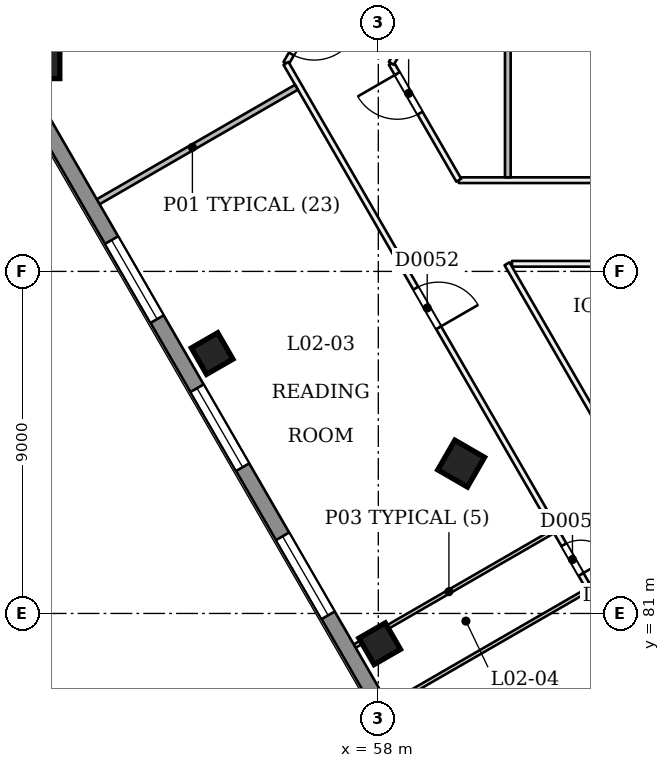
"""IFC4 building model, lengths in metres.
Left out: names, types, materials, properties, quantities, classifications, styles, units other than length and angle.
Written with IfcOpenShell. Run it as: python <this file> out.ifc"""

import sys

from ifc_helpers import new_model, si_unit, direction, frame, frame_2d, origin, origin_2d, place, context, subcontext, project, spatial, rectangle, extrude, element, fill, save


model = new_model("IFC4")
c1 = context("Model", 3, precision=1e-05, world=origin(), true_north=direction((0.0, 1.0)))
c2 = subcontext(c1, "Body", "Model", "MODEL_VIEW")
j1 = project(units=[si_unit("LENGTHUNIT", "METRE"), si_unit("PLANEANGLEUNIT", "RADIAN")], contexts=[c1])
p1 = place(None, origin())
s1 = spatial("IfcSite", under=j1, at=p1, CompositionType="ELEMENT")
p2 = place(p1, origin())
s2 = spatial("IfcBuilding", under=s1, at=p2, CompositionType="ELEMENT")
p3 = place(p2, frame((0.0, 0.0, 13.5)))
s3 = spatial("IfcBuildingStorey", under=s2, at=p3, CompositionType="ELEMENT", Elevation=13.5)
p4 = place(p3, frame((60.153, 84.896, -0.027), z_axis=(0.022221996839, 0.038427794534, 0.999014257888), x_axis=(-0.865947521527, -0.498655202022, 0.038443197811)))
e1 = element("IfcColumn", 1, at=p4, inside=s3, PredefinedType="COLUMN", context=c2, shape_type="SweptSolid", body=[
    extrude(rectangle(XDim=0.9, YDim=0.9, at=origin_2d()), origin(), (0.0, 0.0, 1.0), 4.504),
])
for number, where, z_axis, x_axis in (
    (2, (49.219, 95.474, 0.0), (0.0, 0.0, 1.0), (1.0, 1.745e-08, 0.0)),
    (3, (53.628, 87.838, 0.0), (0.0, 0.0, 1.0), (0.866, 0.5, 0.0)),
    (4, (58.036, 80.203, 0.0), (0.0, 0.0, 1.0), (0.866, 0.5, 0.0)),
):
    element("IfcColumn", number, at=place(p3, frame(where, z_axis=z_axis, x_axis=x_axis)), inside=s3, PredefinedType="COLUMN", context=c2, shape_type="SweptSolid", body=[
        extrude(rectangle(XDim=0.8, YDim=0.8, at=origin_2d()), origin(), (0.0, 0.0, 1.0), 4.5),
    ])
p5 = place(p3, frame((57.318, 98.5, 0.0), z_axis=(0.0, 0.0, 1.0), x_axis=(-0.500008701212, -0.866020380079, 0.0)))
e5 = element("IfcWall", 5, at=p5, inside=s3, PredefinedType="PARTITIONING", context=c2, shape_type="SweptSolid", body=[
    extrude(rectangle(XDim=3.495, YDim=0.15, at=frame_2d((1.747, 0.0))), origin(), (0.0, 0.0, 1.0), 4.05),
])
p6 = place(p5, frame((2.009, 0.0, 0.0)))
e6 = element("IfcOpeningElement", 6, at=p6, cuts=e5, PredefinedType="OPENING", context=c2, shape_type="SweptSolid", body=[
    extrude(rectangle(XDim=1.2, YDim=2.1, at=frame_2d((0.6, 1.05))), frame((0.0, 0.085, 0.0), z_axis=(0.0, -1.0, 0.0), x_axis=(1.0, 0.0, 0.0)), (0.0, 0.0, 1.0), 0.171),
])
p7 = place(p3, frame((55.57, 95.474, 0.0), z_axis=(0.0, 0.0, 1.0), x_axis=(0.500000085768, -0.866025354266, 0.0)))
e7 = element("IfcWall", 7, at=p7, inside=s3, PredefinedType="PARTITIONING", context=c2, shape_type="SweptSolid", body=[
    extrude(rectangle(XDim=55.365, YDim=0.15, at=frame_2d((27.682, 0.0))), origin(), (0.0, 0.0, 1.0), 4.05),
])
p8 = place(p7, frame((6.832, 0.0, 0.0)))
e8 = element("IfcOpeningElement", 8, at=p8, cuts=e7, PredefinedType="OPENING", context=c2, shape_type="SweptSolid", body=[
    extrude(rectangle(XDim=1.2, YDim=2.1, at=frame_2d((0.6, 1.05))), frame((0.0, 0.085, 0.0), z_axis=(0.0, -1.0, 0.0), x_axis=(1.0, 0.0, 0.0)), (0.0, 0.0, 1.0), 0.171),
])
p9 = place(p7, frame((14.626, 0.0, 0.0)))
e9 = element("IfcOpeningElement", 9, at=p9, cuts=e7, PredefinedType="OPENING", context=c2, shape_type="SweptSolid", body=[
    extrude(rectangle(XDim=0.9, YDim=2.1, at=frame_2d((0.45, 1.05))), frame((0.0, 0.085, 0.0), z_axis=(0.0, -1.0, 0.0), x_axis=(1.0, 0.0, 0.0)), (0.0, 0.0, 1.0), 0.171),
])
p10 = place(p7, frame((16.876, 0.0, 0.0)))
e10 = element("IfcOpeningElement", 10, at=p10, cuts=e7, PredefinedType="OPENING", context=c2, shape_type="SweptSolid", body=[
    extrude(rectangle(XDim=0.9, YDim=2.1, at=frame_2d((0.45, 1.05))), frame((0.0, 0.085, 0.0), z_axis=(0.0, -1.0, 0.0), x_axis=(1.0, 0.0, 0.0)), (0.0, 0.0, 1.0), 0.171),
])
p11 = place(p7, frame((24.832, 0.0, 0.0)))
e11 = element("IfcOpeningElement", 11, at=p11, cuts=e7, PredefinedType="OPENING", context=c2, shape_type="SweptSolid", body=[
    extrude(rectangle(XDim=1.2, YDim=2.1, at=frame_2d((0.6, 1.05))), frame((0.0, 0.085, 0.0), z_axis=(0.0, -1.0, 0.0), x_axis=(1.0, 0.0, 0.0)), (0.0, 0.0, 1.0), 0.171),
])
p12 = place(p7, frame((36.082, 0.0, 0.0)))
e12 = element("IfcOpeningElement", 12, at=p12, cuts=e7, PredefinedType="OPENING", context=c2, shape_type="SweptSolid", body=[
    extrude(rectangle(XDim=1.2, YDim=2.1, at=frame_2d((0.6, 1.05))), frame((0.0, 0.085, 0.0), z_axis=(0.0, -1.0, 0.0), x_axis=(1.0, 0.0, 0.0)), (0.0, 0.0, 1.0), 0.171),
])
p13 = place(p7, frame((45.082, 0.0, 0.0)))
e13 = element("IfcOpeningElement", 13, at=p13, cuts=e7, PredefinedType="OPENING", context=c2, shape_type="SweptSolid", body=[
    extrude(rectangle(XDim=1.2, YDim=2.1, at=frame_2d((0.6, 1.05))), frame((0.0, 0.085, 0.0), z_axis=(0.0, -1.0, 0.0), x_axis=(1.0, 0.0, 0.0)), (0.0, 0.0, 1.0), 0.171),
])
p14 = place(p7, frame((53.295, 0.0, 0.0)))
e14 = element("IfcOpeningElement", 14, at=p14, cuts=e7, PredefinedType="OPENING", context=c2, shape_type="SweptSolid", body=[
    extrude(rectangle(XDim=1.0, YDim=2.1, at=frame_2d((0.5, 1.05))), frame((0.0, 0.085, 0.0), z_axis=(0.0, -1.0, 0.0), x_axis=(1.0, 0.0, 0.0)), (0.0, 0.0, 1.0), 0.171),
])
p15 = place(p3, frame((61.516, 90.2, 0.0), z_axis=(0.0, 0.0, 1.0), x_axis=(1.0, 0.0, 0.0)))
e15 = element("IfcWall", 15, at=p15, inside=s3, PredefinedType="PARTITIONING", context=c2, shape_type="SweptSolid", body=[
    extrude(rectangle(XDim=16.884, YDim=0.15, at=frame_2d((8.442, 0.0))), origin(), (0.0, 0.0, 1.0), 4.05),
])
p16 = place(p15, frame((15.398, 0.0, 0.0)))
e16 = element("IfcOpeningElement", 16, at=p16, cuts=e15, PredefinedType="OPENING", context=c2, shape_type="SweptSolid", body=[
    extrude(rectangle(XDim=1.2, YDim=2.1, at=frame_2d((0.6, 1.05))), frame((0.0, 0.085, 0.0), z_axis=(0.0, -1.0, 0.0), x_axis=(1.0, 0.0, 0.0)), (0.0, 0.0, 1.0), 0.171),
])
p17 = place(p3, frame((70.2, 92.4, 0.0), z_axis=(0.0, 0.0, 1.0), x_axis=(-1.0, 0.0, 0.0)))
e17 = element("IfcWall", 17, at=p17, inside=s3, PredefinedType="PARTITIONING", context=c2, shape_type="SweptSolid", body=[
    extrude(rectangle(XDim=10.084, YDim=0.15, at=frame_2d((5.042, 0.0))), origin(), (0.0, 0.0, 1.0), 4.05),
])
p18 = place(p17, frame((3.503, 0.0, 0.0)))
e18 = element("IfcOpeningElement", 18, at=p18, cuts=e17, PredefinedType="OPENING", context=c2, shape_type="SweptSolid", body=[
    extrude(rectangle(XDim=1.2, YDim=2.1, at=frame_2d((0.6, 1.05))), frame((0.0, 0.085, 0.0), z_axis=(0.0, -1.0, 0.0), x_axis=(1.0, 0.0, 0.0)), (0.0, 0.0, 1.0), 0.171),
])
p19 = place(p3, frame((77.321, 62.6, 0.0), z_axis=(0.0, 0.0, 1.0), x_axis=(-0.500000743568, 0.866024974485, 0.0)))
e19 = element("IfcWall", 19, at=p19, inside=s3, PredefinedType="PARTITIONING", context=c2, shape_type="SweptSolid", body=[
    extrude(rectangle(XDim=31.87, YDim=0.15, at=frame_2d((15.935, 0.0))), origin(), (0.0, 0.0, 1.0), 4.05),
])
p20 = place(p19, frame((22.081, 0.0, 0.0)))
e20 = element("IfcOpeningElement", 20, at=p20, cuts=e19, PredefinedType="OPENING", context=c2, shape_type="SweptSolid", body=[
    extrude(rectangle(XDim=1.0, YDim=2.1, at=frame_2d((0.5, 1.05))), frame((0.0, 0.085, 0.0), z_axis=(0.0, -1.0, 0.0), x_axis=(1.0, 0.0, 0.0)), (0.0, 0.0, 1.0), 0.171),
])
p21 = place(p19, frame((6.657, 0.0, 0.0)))
e21 = element("IfcOpeningElement", 21, at=p21, cuts=e19, PredefinedType="OPENING", context=c2, shape_type="SweptSolid", body=[
    extrude(rectangle(XDim=1.2, YDim=2.1, at=frame_2d((0.6, 1.05))), frame((0.0, 0.085, 0.0), z_axis=(0.0, -1.0, 0.0), x_axis=(1.0, 0.0, 0.0)), (0.0, 0.0, 1.0), 0.171),
])
p22 = place(p3, frame((60.116, 92.4, 0.0), z_axis=(0.0, 0.0, 1.0), x_axis=(-0.500008260065, 0.866020634781, 0.0)))
e22 = element("IfcWall", 22, at=p22, inside=s3, PredefinedType="PARTITIONING", context=c2, shape_type="SweptSolid", body=[
    extrude(rectangle(XDim=3.549, YDim=0.15, at=frame_2d((1.775, 0.0))), origin(), (0.0, 0.0, 1.0), 4.05),
])
p23 = place(p22, frame((2.037, 0.0, 0.0)))
e23 = element("IfcOpeningElement", 23, at=p23, cuts=e22, PredefinedType="OPENING", context=c2, shape_type="SweptSolid", body=[
    extrude(rectangle(XDim=1.2, YDim=2.1, at=frame_2d((0.6, 1.05))), frame((0.0, 0.085, 0.0), z_axis=(0.0, -1.0, 0.0), x_axis=(1.0, 0.0, 0.0)), (0.0, 0.0, 1.0), 0.171),
])
p24 = place(p3, frame((58.342, 95.474, 0.0), z_axis=(0.0, 0.0, 1.0), x_axis=(0.500008701212, 0.866020380079, 0.0)))
e24 = element("IfcWall", 24, at=p24, inside=s3, PredefinedType="PARTITIONING", context=c2, shape_type="SweptSolid", body=[
    extrude(rectangle(XDim=3.495, YDim=0.15, at=frame_2d((1.747, 0.0))), origin(), (0.0, 0.0, 1.0), 4.05),
])
p25 = place(p3, frame((50.369, 91.683, 0.0), z_axis=(0.0, 0.0, 1.0), x_axis=(0.866025537322, 0.499999768706, 0.0)))
e25 = element("IfcWall", 25, at=p25, inside=s3, PredefinedType="PARTITIONING", context=c2, shape_type="SweptSolid", body=[
    extrude(rectangle(XDim=6.325, YDim=0.15, at=frame_2d((3.163, 0.0))), origin(), (0.0, 0.0, 1.0), 4.05),
])
p26 = place(p3, frame((57.119, 79.991, 0.0), z_axis=(0.0, 0.0, 1.0), x_axis=(0.866042250622, 0.499970819286, 0.0)))
e26 = element("IfcWall", 26, at=p26, inside=s3, PredefinedType="PARTITIONING", context=c2, shape_type="SweptSolid", body=[
    extrude(rectangle(XDim=6.325, YDim=0.1, at=frame_2d((3.163, 0.0))), origin(), (0.0, 0.0, 1.0), 4.05),
])
p27 = place(p3, frame((58.013, 78.443, 0.0), z_axis=(0.0, 0.0, 1.0), x_axis=(0.866032601554, 0.49998753289, 0.0)))
e27 = element("IfcWall", 27, at=p27, inside=s3, PredefinedType="PARTITIONING", context=c2, shape_type="SweptSolid", body=[
    extrude(rectangle(XDim=6.325, YDim=0.1, at=frame_2d((3.163, 0.0))), origin(), (0.0, 0.0, 1.0), 4.05),
])
p28 = place(p3, frame((59.369, 76.094, 0.0), z_axis=(0.0, 0.0, 1.0), x_axis=(0.866025537322, 0.499999768706, 0.0)))
e28 = element("IfcWall", 28, at=p28, inside=s3, PredefinedType="PARTITIONING", context=c2, shape_type="SweptSolid", body=[
    extrude(rectangle(XDim=6.325, YDim=0.1, at=frame_2d((3.163, 0.0))), origin(), (0.0, 0.0, 1.0), 4.05),
])
p29 = place(p3, frame((61.408, 104.9, 0.0), z_axis=(0.0, 0.0, 1.0), x_axis=(0.0, -1.0, 0.0)))
e29 = element("IfcWall", 29, at=p29, inside=s3, PredefinedType="PARTITIONING", context=c2, shape_type="SweptSolid", body=[
    extrude(rectangle(XDim=12.425, YDim=0.15, at=frame_2d((6.212, 0.0))), origin(), (0.0, 0.0, 1.0), 4.05),
])
p30 = place(p3, frame((48.238, 95.374, 0.0), z_axis=(0.0, 0.0, 1.0), x_axis=(0.50000615651, 0.866021849293, 0.0)))
e30 = element("IfcWall", 30, at=p30, inside=s3, PredefinedType="SOLIDWALL", context=c2, shape_type="SweptSolid", body=[
    extrude(rectangle(XDim=11.0, YDim=0.4, at=frame_2d((5.5, 0.0))), origin(), (0.0, 0.0, 1.0), 4.05),
])
p31 = place(p3, frame((79.673, 41.126, 0.0), z_axis=(0.0, 0.0, 1.0), x_axis=(-0.499997306052, 0.866026959131, 0.0)))
e31 = element("IfcWall", 31, at=p31, inside=s3, PredefinedType="SOLIDWALL", context=c2, shape_type="SweptSolid", body=[
    extrude(rectangle(XDim=62.87, YDim=0.4, at=frame_2d((31.435, 0.0))), origin(), (0.0, 0.0, 1.0), 4.05),
])
p32 = place(p31, frame((54.986, 0.0, 0.9)))
e32 = element("IfcOpeningElement", 32, at=p32, cuts=e31, PredefinedType="OPENING", context=c2, shape_type="SweptSolid", body=[
    extrude(rectangle(XDim=2.4, YDim=1.5, at=frame_2d((1.2, 0.75))), frame((0.0, 0.21, 0.0), z_axis=(0.0, -1.0, 0.0), x_axis=(1.0, 0.0, 0.0)), (0.0, 0.0, 1.0), 0.421),
])
p33 = place(p31, frame((50.486, 0.0, 0.9)))
e33 = element("IfcOpeningElement", 33, at=p33, cuts=e31, PredefinedType="OPENING", context=c2, shape_type="SweptSolid", body=[
    extrude(rectangle(XDim=2.4, YDim=1.5, at=frame_2d((1.2, 0.75))), frame((0.0, 0.21, 0.0), z_axis=(0.0, -1.0, 0.0), x_axis=(1.0, 0.0, 0.0)), (0.0, 0.0, 1.0), 0.421),
])
p34 = place(p31, frame((45.986, 0.0, 0.9)))
e34 = element("IfcOpeningElement", 34, at=p34, cuts=e31, PredefinedType="OPENING", context=c2, shape_type="SweptSolid", body=[
    extrude(rectangle(XDim=2.4, YDim=1.5, at=frame_2d((1.2, 0.75))), frame((0.0, 0.21, 0.0), z_axis=(0.0, -1.0, 0.0), x_axis=(1.0, 0.0, 0.0)), (0.0, 0.0, 1.0), 0.421),
])
p35 = place(p31, frame((32.486, 0.0, 0.9)))
e35 = element("IfcOpeningElement", 35, at=p35, cuts=e31, PredefinedType="OPENING", context=c2, shape_type="SweptSolid", body=[
    extrude(rectangle(XDim=2.4, YDim=1.5, at=frame_2d((1.2, 0.75))), frame((0.0, 0.21, 0.0), z_axis=(0.0, -1.0, 0.0), x_axis=(1.0, 0.0, 0.0)), (0.0, 0.0, 1.0), 0.421),
])
p36 = place(p31, frame((27.986, 0.0, 0.9)))
e36 = element("IfcOpeningElement", 36, at=p36, cuts=e31, PredefinedType="OPENING", context=c2, shape_type="SweptSolid", body=[
    extrude(rectangle(XDim=2.4, YDim=1.5, at=frame_2d((1.2, 0.75))), frame((0.0, 0.21, 0.0), z_axis=(0.0, -1.0, 0.0), x_axis=(1.0, 0.0, 0.0)), (0.0, 0.0, 1.0), 0.421),
])
p37 = place(p31, frame((23.486, 0.0, 0.9)))
e37 = element("IfcOpeningElement", 37, at=p37, cuts=e31, PredefinedType="OPENING", context=c2, shape_type="SweptSolid", body=[
    extrude(rectangle(XDim=2.4, YDim=1.5, at=frame_2d((1.2, 0.75))), frame((0.0, 0.21, 0.0), z_axis=(0.0, -1.0, 0.0), x_axis=(1.0, 0.0, 0.0)), (0.0, 0.0, 1.0), 0.421),
])
p38 = place(p31, frame((18.986, 0.0, 0.9)))
e38 = element("IfcOpeningElement", 38, at=p38, cuts=e31, PredefinedType="OPENING", context=c2, shape_type="SweptSolid", body=[
    extrude(rectangle(XDim=2.4, YDim=1.5, at=frame_2d((1.2, 0.75))), frame((0.0, 0.21, 0.0), z_axis=(0.0, -1.0, 0.0), x_axis=(1.0, 0.0, 0.0)), (0.0, 0.0, 1.0), 0.421),
])
p39 = place(p31, frame((14.486, 0.0, 0.9)))
e39 = element("IfcOpeningElement", 39, at=p39, cuts=e31, PredefinedType="OPENING", context=c2, shape_type="SweptSolid", body=[
    extrude(rectangle(XDim=2.4, YDim=1.5, at=frame_2d((1.2, 0.75))), frame((0.0, 0.21, 0.0), z_axis=(0.0, -1.0, 0.0), x_axis=(1.0, 0.0, 0.0)), (0.0, 0.0, 1.0), 0.421),
])
p40 = place(p6, origin())
e40 = element("IfcDoor", 40, at=p40, inside=s3, OperationType="SINGLE_SWING_LEFT", PredefinedType="NOTDEFINED", context=c2, shape_type="SweptSolid", body=[
    extrude(rectangle(XDim=1.2, YDim=2.1, at=frame_2d((0.6, 1.05))), frame((0.0, 0.025, 0.0), z_axis=(0.0, -1.0, 0.0), x_axis=(1.0, 0.0, 0.0)), (0.0, 0.0, 1.0), 0.05),
])
fill(e6, e40)
p41 = place(p8, origin())
e41 = element("IfcDoor", 41, at=p41, inside=s3, OperationType="SINGLE_SWING_RIGHT", PredefinedType="NOTDEFINED", context=c2, shape_type="SweptSolid", body=[
    extrude(rectangle(XDim=1.2, YDim=2.1, at=frame_2d((0.6, 1.05))), frame((0.0, 0.025, 0.0), z_axis=(0.0, -1.0, 0.0), x_axis=(1.0, 0.0, 0.0)), (0.0, 0.0, 1.0), 0.05),
])
fill(e8, e41)
p42 = place(p9, origin())
e42 = element("IfcDoor", 42, at=p42, inside=s3, OperationType="SINGLE_SWING_RIGHT", PredefinedType="NOTDEFINED", context=c2, shape_type="SweptSolid", body=[
    extrude(rectangle(XDim=0.9, YDim=2.1, at=frame_2d((0.45, 1.05))), frame((0.0, 0.025, 0.0), z_axis=(0.0, -1.0, 0.0), x_axis=(1.0, 0.0, 0.0)), (0.0, 0.0, 1.0), 0.05),
])
fill(e9, e42)
p43 = place(p23, origin())
e43 = element("IfcDoor", 43, at=p43, inside=s3, OperationType="SINGLE_SWING_RIGHT", PredefinedType="NOTDEFINED", context=c2, shape_type="SweptSolid", body=[
    extrude(rectangle(XDim=1.2, YDim=2.1, at=frame_2d((0.6, 1.05))), frame((0.0, 0.025, 0.0), z_axis=(0.0, -1.0, 0.0), x_axis=(1.0, 0.0, 0.0)), (0.0, 0.0, 1.0), 0.05),
])
fill(e23, e43)
p44 = place(p32, origin())
e44 = element("IfcWindow", 44, at=p44, inside=s3, PartitioningType="SINGLE_PANEL", PredefinedType="WINDOW", context=c2, shape_type="SweptSolid", body=[
    extrude(rectangle(XDim=2.4, YDim=1.5, at=frame_2d((1.2, 0.75))), frame((0.0, 0.03, 0.0), z_axis=(0.0, -1.0, 0.0), x_axis=(1.0, 0.0, 0.0)), (0.0, 0.0, 1.0), 0.06),
])
fill(e32, e44)
p45 = place(p33, origin())
e45 = element("IfcWindow", 45, at=p45, inside=s3, PartitioningType="SINGLE_PANEL", PredefinedType="WINDOW", context=c2, shape_type="SweptSolid", body=[
    extrude(rectangle(XDim=2.4, YDim=1.5, at=frame_2d((1.2, 0.75))), frame((0.0, 0.03, 0.0), z_axis=(0.0, -1.0, 0.0), x_axis=(1.0, 0.0, 0.0)), (0.0, 0.0, 1.0), 0.06),
])
fill(e33, e45)
p46 = place(p34, origin())
e46 = element("IfcWindow", 46, at=p46, inside=s3, PartitioningType="SINGLE_PANEL", PredefinedType="WINDOW", context=c2, shape_type="SweptSolid", body=[
    extrude(rectangle(XDim=2.4, YDim=1.5, at=frame_2d((1.2, 0.75))), frame((0.0, 0.03, 0.0), z_axis=(0.0, -1.0, 0.0), x_axis=(1.0, 0.0, 0.0)), (0.0, 0.0, 1.0), 0.06),
])
fill(e34, e46)
save(model, sys.argv[1])
